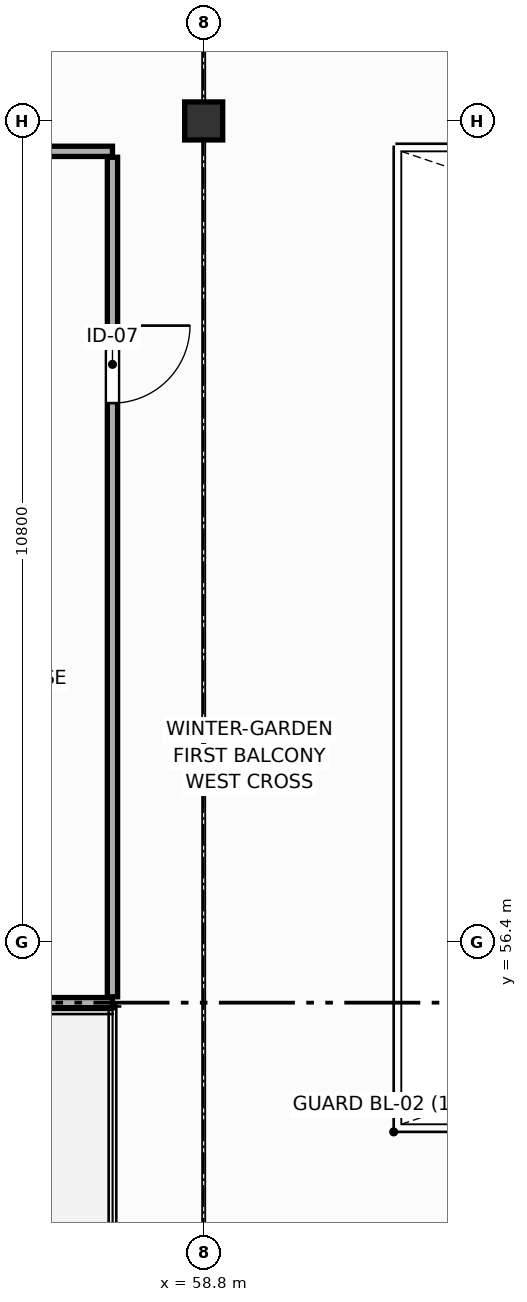
"""IFC4 building model, lengths in metres.
Left out: names, types, materials, properties, quantities, classifications, styles, units other than length and angle.
Written with IfcOpenShell. Run it as: python <this file> out.ifc"""

import sys

from ifc_helpers import new_model, si_unit, direction, frame, frame_2d, origin, origin_2d, place, context, subcontext, project, spatial, rectangle, extrude, element, fill, save


model = new_model("IFC4")
c1 = context("Model", 3, precision=1e-05, world=origin(), true_north=direction((0.0, 1.0)))
c2 = subcontext(c1, "Body", "Model", "MODEL_VIEW")
j1 = project(units=[si_unit("LENGTHUNIT", "METRE"), si_unit("PLANEANGLEUNIT", "RADIAN")], contexts=[c1])
p1 = place(None, origin())
s1 = spatial("IfcSite", under=j1, at=p1, CompositionType="ELEMENT")
p2 = place(p1, origin())
s2 = spatial("IfcBuilding", under=s1, at=p2, CompositionType="ELEMENT")
p3 = place(p2, frame((0.0, 0.0, 5.4)))
s3 = spatial("IfcBuildingStorey", under=s2, at=p3, CompositionType="ELEMENT", Elevation=5.4)
p4 = place(p3, frame((58.8, 67.2, 0.0), z_axis=(0.0, 0.0, 1.0), x_axis=(1.0, 0.0, 0.0)))
e1 = element("IfcColumn", 1, at=p4, inside=s3, PredefinedType="COLUMN", context=c2, shape_type="SweptSolid", body=[
    extrude(rectangle(XDim=0.5, YDim=0.5, at=origin_2d()), origin(), (0.0, 0.0, 1.0), 4.5),
])
p5 = place(p3, frame((46.8, 66.8, 0.0), z_axis=(0.0, 0.0, 1.0), x_axis=(1.0, 0.0, 0.0)))
e2 = element("IfcWall", 2, at=p5, inside=s3, PredefinedType="PARTITIONING", context=c2, shape_type="SweptSolid", body=[
    extrude(rectangle(XDim=10.8, YDim=0.135, at=frame_2d((5.4, 0.0))), origin(), (0.0, 0.0, 1.0), 3.33),
])
p6 = place(p3, frame((57.6, 55.6, 0.0), z_axis=(0.0, 0.0, 1.0), x_axis=(-1.0, 0.0, 0.0)))
e3 = element("IfcWall", 3, at=p6, inside=s3, PredefinedType="PARTITIONING", context=c2, shape_type="SweptSolid", body=[
    extrude(rectangle(XDim=10.8, YDim=0.135, at=frame_2d((5.4, 0.0))), origin(), (0.0, 0.0, 1.0), 4.225),
])
p7 = place(p3, frame((57.6, 66.722, 0.0), z_axis=(0.0, 0.0, 1.0), x_axis=(0.0, -1.0, 0.0)))
e4 = element("IfcWall", 4, at=p7, inside=s3, PredefinedType="PARTITIONING", context=c2, shape_type="SweptSolid", body=[
    extrude(rectangle(XDim=11.045, YDim=0.135, at=frame_2d((5.522, 0.0))), origin(), (0.0, 0.0, 1.0), 3.33),
])
p8 = place(p7, frame((2.215, 0.0, 0.0)))
e5 = element("IfcOpeningElement", 5, at=p8, cuts=e4, PredefinedType="OPENING", context=c2, shape_type="SweptSolid", body=[
    extrude(rectangle(XDim=1.02, YDim=2.15, at=frame_2d((0.51, 1.075))), frame((0.0, 0.077, 0.0), z_axis=(0.0, -1.0, 0.0), x_axis=(1.0, 0.0, 0.0)), (0.0, 0.0, 1.0), 0.155),
])
p9 = place(p8, origin())
e6 = element("IfcDoor", 6, at=p9, inside=s3, OperationType="SINGLE_SWING_LEFT", PredefinedType="DOOR", context=c2, shape_type="SweptSolid", body=[
    extrude(rectangle(XDim=1.02, YDim=2.15, at=frame_2d((0.51, 1.075))), frame((0.0, 0.025, 0.0), z_axis=(0.0, -1.0, 0.0), x_axis=(1.0, 0.0, 0.0)), (0.0, 0.0, 1.0), 0.05),
])
fill(e5, e6)
save(model, sys.argv[1])
